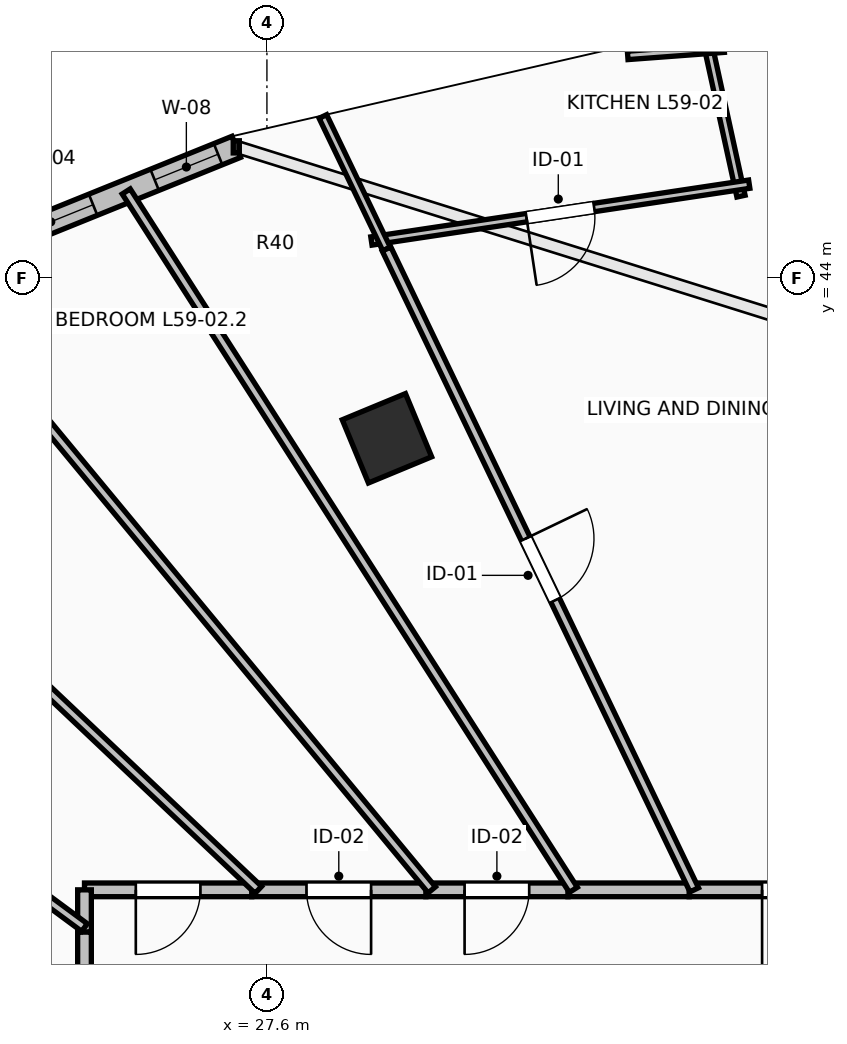
"""IFC4 building model, lengths in metres.
Left out: names, types, materials, properties, quantities, classifications, styles, units other than length and angle.
Written with IfcOpenShell. Run it as: python <this file> out.ifc"""

import sys

from ifc_helpers import new_model, si_unit, direction, frame, frame_2d, origin, origin_2d, place, context, subcontext, project, spatial, rectangle, extrude, element, fill, save


model = new_model("IFC4")
c1 = context("Model", 3, precision=1e-05, world=origin(), true_north=direction((0.0, 1.0)))
c2 = subcontext(c1, "Body", "Model", "MODEL_VIEW")
j1 = project(units=[si_unit("LENGTHUNIT", "METRE"), si_unit("PLANEANGLEUNIT", "RADIAN")], contexts=[c1])
p1 = place(None, origin())
s1 = spatial("IfcSite", under=j1, at=p1, CompositionType="ELEMENT")
p2 = place(p1, origin())
s2 = spatial("IfcBuilding", under=s1, at=p2, CompositionType="ELEMENT")
p3 = place(p2, frame((0.0, 0.0, 217.85)))
s3 = spatial("IfcBuildingStorey", under=s2, at=p3, CompositionType="ELEMENT", Elevation=217.85)
p4 = place(p3, frame((29.179, 41.891, 0.0), z_axis=(0.0, 0.0, 1.0), x_axis=(-0.382683432365, 0.923879532511, 0.0)))
e1 = element("IfcColumn", 1, at=p4, inside=s3, PredefinedType="COLUMN", context=c2, shape_type="SweptSolid", body=[
    extrude(rectangle(XDim=0.9, YDim=0.9, at=origin_2d()), origin(), (0.0, 0.0, 1.0), 3.55),
])
p5 = place(p3, frame((27.197, 45.725, 0.0), z_axis=(0.0, 0.0, 1.0), x_axis=(-0.927111094334, -0.374786630981, 0.0)))
e2 = element("IfcWall", 2, at=p5, inside=s3, PredefinedType="STANDARD", context=c2, shape_type="SweptSolid", body=[
    extrude(rectangle(XDim=5.264, YDim=0.3, at=frame_2d((2.632, 0.0))), origin(), (0.0, 0.0, 1.0), 3.29),
])
p6 = place(p5, frame((0.258, 0.0, 0.85)))
e3 = element("IfcOpeningElement", 3, at=p6, cuts=e2, PredefinedType="OPENING", context=c2, shape_type="SweptSolid", body=[
    extrude(rectangle(XDim=0.9, YDim=1.8, at=frame_2d((0.45, 0.9))), frame((0.0, 0.165, 0.0), z_axis=(0.0, -1.0, 0.0), x_axis=(1.0, 0.0, 0.0)), (0.0, 0.0, 1.0), 0.33),
])
p7 = place(p5, frame((2.032, 0.0, 0.85)))
e4 = element("IfcOpeningElement", 4, at=p7, cuts=e2, PredefinedType="OPENING", context=c2, shape_type="SweptSolid", body=[
    extrude(rectangle(XDim=1.2, YDim=1.95, at=frame_2d((0.6, 0.975))), frame((0.0, 0.165, 0.0), z_axis=(0.0, -1.0, 0.0), x_axis=(1.0, 0.0, 0.0)), (0.0, 0.0, 1.0), 0.33),
])
p8 = place(p3, frame((36.074, 35.95, 0.0), z_axis=(0.0, 0.0, 1.0), x_axis=(-1.0, 0.0, 0.0)))
e5 = element("IfcWall", 5, at=p8, inside=s3, PredefinedType="PARTITIONING", context=c2, shape_type="SweptSolid", body=[
    extrude(rectangle(XDim=2.919, YDim=0.18, at=frame_2d((1.459, 0.0))), origin(), (0.0, 0.0, 1.0), 3.29),
])
p9 = place(p8, frame((0.959, 0.0, 0.0)))
e6 = element("IfcOpeningElement", 6, at=p9, cuts=e5, PredefinedType="OPENING", context=c2, shape_type="SweptSolid", body=[
    extrude(rectangle(XDim=1.0, YDim=2.15, at=frame_2d((0.5, 1.075))), frame((0.0, 0.105, 0.0), z_axis=(0.0, -1.0, 0.0), x_axis=(1.0, 0.0, 0.0)), (0.0, 0.0, 1.0), 0.21),
])
p10 = place(p3, frame((33.155, 35.95, 0.0), z_axis=(0.0, 0.0, 1.0), x_axis=(-1.0, 0.0, 0.0)))
e7 = element("IfcWall", 7, at=p10, inside=s3, PredefinedType="PARTITIONING", context=c2, shape_type="SweptSolid", body=[
    extrude(rectangle(XDim=1.595, YDim=0.18, at=frame_2d((0.797, 0.0))), origin(), (0.0, 0.0, 1.0), 3.29),
])
p11 = place(p3, frame((31.56, 35.95, 0.0), z_axis=(0.0, 0.0, 1.0), x_axis=(-1.0, 0.0, 0.0)))
e8 = element("IfcWall", 8, at=p11, inside=s3, PredefinedType="PARTITIONING", context=c2, shape_type="SweptSolid", body=[
    extrude(rectangle(XDim=1.869, YDim=0.18, at=frame_2d((0.935, 0.0))), origin(), (0.0, 0.0, 1.0), 2.482),
])
p12 = place(p11, frame((0.51, 0.0, 0.0)))
e9 = element("IfcOpeningElement", 9, at=p12, cuts=e8, PredefinedType="OPENING", context=c2, shape_type="SweptSolid", body=[
    extrude(rectangle(XDim=0.85, YDim=2.1, at=frame_2d((0.425, 1.05))), frame((0.0, 0.105, 0.0), z_axis=(0.0, -1.0, 0.0), x_axis=(1.0, 0.0, 0.0)), (0.0, 0.0, 1.0), 0.21),
])
p13 = place(p3, frame((29.691, 35.95, 0.0), z_axis=(0.0, 0.0, 1.0), x_axis=(-1.0, 0.0, 0.0)))
e10 = element("IfcWall", 10, at=p13, inside=s3, PredefinedType="PARTITIONING", context=c2, shape_type="SweptSolid", body=[
    extrude(rectangle(XDim=2.291, YDim=0.18, at=frame_2d((1.146, 0.0))), origin(), (0.0, 0.0, 1.0), 2.482),
])
p14 = place(p13, frame((0.72, 0.0, 0.0)))
e11 = element("IfcOpeningElement", 11, at=p14, cuts=e10, PredefinedType="OPENING", context=c2, shape_type="SweptSolid", body=[
    extrude(rectangle(XDim=0.85, YDim=2.1, at=frame_2d((0.425, 1.05))), frame((0.0, 0.105, 0.0), z_axis=(0.0, -1.0, 0.0), x_axis=(1.0, 0.0, 0.0)), (0.0, 0.0, 1.0), 0.21),
])
p15 = place(p3, frame((27.4, 35.95, 0.0), z_axis=(0.0, 0.0, 1.0), x_axis=(-1.0, 0.0, 0.0)))
e12 = element("IfcWall", 12, at=p15, inside=s3, PredefinedType="PARTITIONING", context=c2, shape_type="SweptSolid", body=[
    extrude(rectangle(XDim=2.2, YDim=0.18, at=frame_2d((1.1, 0.0))), origin(), (0.0, 0.0, 1.0), 2.924),
])
p16 = place(p15, frame((0.675, 0.0, 0.0)))
e13 = element("IfcOpeningElement", 13, at=p16, cuts=e12, PredefinedType="OPENING", context=c2, shape_type="SweptSolid", body=[
    extrude(rectangle(XDim=0.85, YDim=2.1, at=frame_2d((0.425, 1.05))), frame((0.0, 0.105, 0.0), z_axis=(0.0, -1.0, 0.0), x_axis=(1.0, 0.0, 0.0)), (0.0, 0.0, 1.0), 0.21),
])
p17 = place(p3, frame((25.2, 35.95, 0.0), z_axis=(0.0, 0.0, 1.0), x_axis=(0.0, -1.0, 0.0)))
e14 = element("IfcWall", 14, at=p17, inside=s3, PredefinedType="PARTITIONING", context=c2, shape_type="SweptSolid", body=[
    extrude(rectangle(XDim=0.556, YDim=0.18, at=frame_2d((0.278, 0.0))), origin(), (0.0, 0.0, 1.0), 3.29),
])
p18 = place(p3, frame((25.2, 35.394, 0.0), z_axis=(0.0, 0.0, 1.0), x_axis=(0.0, -1.0, 0.0)))
e15 = element("IfcWall", 15, at=p18, inside=s3, PredefinedType="PARTITIONING", context=c2, shape_type="SweptSolid", body=[
    extrude(rectangle(XDim=2.219, YDim=0.18, at=frame_2d((1.109, 0.0))), origin(), (0.0, 0.0, 1.0), 2.482),
])
p19 = place(p18, frame((0.685, 0.0, 0.0)))
e16 = element("IfcOpeningElement", 16, at=p19, cuts=e15, PredefinedType="OPENING", context=c2, shape_type="SweptSolid", body=[
    extrude(rectangle(XDim=0.85, YDim=2.1, at=frame_2d((0.425, 1.05))), frame((0.0, 0.105, 0.0), z_axis=(0.0, -1.0, 0.0), x_axis=(1.0, 0.0, 0.0)), (0.0, 0.0, 1.0), 0.21),
])
p20 = place(p3, frame((33.385, 47.144, 0.0), z_axis=(0.0, 0.0, 1.0), x_axis=(0.213521424511, -0.976938381514, 0.0)))
e17 = element("IfcWall", 17, at=p20, inside=s3, PredefinedType="PARTITIONING", context=c2, shape_type="SweptSolid", body=[
    extrude(rectangle(XDim=2.116, YDim=0.11, at=frame_2d((1.058, 0.0))), origin(), (0.0, 0.0, 1.0), 3.29),
])
p21 = place(p3, frame((33.945, 45.234, 0.0), z_axis=(0.0, 0.0, 1.0), x_axis=(-0.988872134662, -0.148767944424, 0.0)))
e18 = element("IfcWall", 18, at=p21, inside=s3, PredefinedType="PARTITIONING", context=c2, shape_type="SweptSolid", body=[
    extrude(rectangle(XDim=5.027, YDim=0.11, at=frame_2d((2.513, 0.0))), origin(), (0.0, 0.0, 1.0), 3.29),
])
p22 = place(p21, frame((2.063, 0.0, 0.0)))
e19 = element("IfcOpeningElement", 19, at=p22, cuts=e18, PredefinedType="OPENING", context=c2, shape_type="SweptSolid", body=[
    extrude(rectangle(XDim=0.9, YDim=2.1, at=frame_2d((0.45, 1.05))), frame((0.0, 0.07, 0.0), z_axis=(0.0, -1.0, 0.0), x_axis=(1.0, 0.0, 0.0)), (0.0, 0.0, 1.0), 0.14),
])
p23 = place(p3, frame((29.174, 44.381, 0.0), z_axis=(0.0, 0.0, 1.0), x_axis=(-0.432866492457, 0.901458041014, 0.0)))
e20 = element("IfcWall", 20, at=p23, inside=s3, PredefinedType="PARTITIONING", context=c2, shape_type="SweptSolid", body=[
    extrude(rectangle(XDim=1.934, YDim=0.11, at=frame_2d((0.967, 0.0))), origin(), (0.0, 0.0, 1.0), 3.29),
])
p24 = place(p3, frame((33.615, 47.022, 0.0), z_axis=(0.0, 0.0, 1.0), x_axis=(-0.997207179737, -0.074684942803, 0.0)))
e21 = element("IfcWall", 21, at=p24, inside=s3, PredefinedType="PARTITIONING", context=c2, shape_type="SweptSolid", body=[
    extrude(rectangle(XDim=1.272, YDim=0.11, at=frame_2d((0.636, 0.0))), origin(), (0.0, 0.0, 1.0), 3.29),
])
p25 = place(p3, frame((29.174, 44.381, 0.0), z_axis=(0.0, 0.0, 1.0), x_axis=(0.432861754343, -0.901460316169, 0.0)))
e22 = element("IfcWall", 22, at=p25, inside=s3, PredefinedType="PARTITIONING", context=c2, shape_type="SweptSolid", body=[
    extrude(rectangle(XDim=9.353, YDim=0.125, at=frame_2d((4.676, 0.0))), origin(), (0.0, 0.0, 1.0), 2.482),
])
p26 = place(p25, frame((4.226, 0.0, 0.0)))
e23 = element("IfcOpeningElement", 23, at=p26, cuts=e22, PredefinedType="OPENING", context=c2, shape_type="SweptSolid", body=[
    extrude(rectangle(XDim=0.9, YDim=2.1, at=frame_2d((0.45, 1.05))), frame((0.0, 0.077, 0.0), z_axis=(0.0, -1.0, 0.0), x_axis=(1.0, 0.0, 0.0)), (0.0, 0.0, 1.0), 0.155),
])
p27 = place(p3, frame((25.749, 45.138, 0.0), z_axis=(0.0, 0.0, 1.0), x_axis=(0.539168632786, -0.842197830335, 0.0)))
e24 = element("IfcWall", 24, at=p27, inside=s3, PredefinedType="PARTITIONING", context=c2, shape_type="SweptSolid", body=[
    extrude(rectangle(XDim=10.909, YDim=0.125, at=frame_2d((5.455, 0.0))), origin(), (0.0, 0.0, 1.0), 2.482),
])
p28 = place(p3, frame((23.066, 44.052, 0.0), z_axis=(0.0, 0.0, 1.0), x_axis=(0.637453668746, -0.770488689211, 0.0)))
e25 = element("IfcWall", 25, at=p28, inside=s3, PredefinedType="PARTITIONING", context=c2, shape_type="SweptSolid", body=[
    extrude(rectangle(XDim=10.515, YDim=0.125, at=frame_2d((5.258, 0.0))), origin(), (0.0, 0.0, 1.0), 2.482),
])
p29 = place(p3, frame((20.462, 42.599, 0.0), z_axis=(0.0, 0.0, 1.0), x_axis=(0.726274273347, -0.687405033349, 0.0)))
e26 = element("IfcWall", 26, at=p29, inside=s3, PredefinedType="PARTITIONING", context=c2, shape_type="SweptSolid", body=[
    extrude(rectangle(XDim=9.673, YDim=0.125, at=frame_2d((4.836, 0.0))), origin(), (0.0, 0.0, 1.0), 2.824),
])
p30 = place(p3, frame((17.826, 40.901, 0.0), z_axis=(0.0, 0.0, 1.0), x_axis=(0.804363169868, -0.594137939338, 0.0)))
e27 = element("IfcWall", 27, at=p30, inside=s3, PredefinedType="PARTITIONING", context=c2, shape_type="SweptSolid", body=[
    extrude(rectangle(XDim=9.167, YDim=0.125, at=frame_2d((4.584, 0.0))), origin(), (0.0, 0.0, 1.0), 2.482),
])
p31 = place(p3, frame((15.476, 38.731, 0.0), z_axis=(0.0, 0.0, 1.0), x_axis=(0.870572608778, -0.49203997078, 0.0)))
e28 = element("IfcWall", 28, at=p31, inside=s3, PredefinedType="PARTITIONING", context=c2, shape_type="SweptSolid", body=[
    extrude(rectangle(XDim=11.169, YDim=0.125, at=frame_2d((5.585, 0.0))), origin(), (0.0, 0.0, 1.0), 2.824),
])
p32 = place(p6, origin())
e29 = element("IfcWindow", 29, at=p32, inside=s3, PartitioningType="SINGLE_PANEL", PredefinedType="WINDOW", context=c2, shape_type="SweptSolid", body=[
    extrude(rectangle(XDim=0.9, YDim=1.8, at=frame_2d((0.45, 0.9))), frame((0.0, 0.03, 0.0), z_axis=(0.0, -1.0, 0.0), x_axis=(1.0, 0.0, 0.0)), (0.0, 0.0, 1.0), 0.06),
])
fill(e3, e29)
p33 = place(p7, origin())
e30 = element("IfcWindow", 30, at=p33, inside=s3, PartitioningType="SINGLE_PANEL", PredefinedType="WINDOW", context=c2, shape_type="SweptSolid", body=[
    extrude(rectangle(XDim=1.2, YDim=1.95, at=frame_2d((0.6, 0.975))), frame((0.0, 0.03, 0.0), z_axis=(0.0, -1.0, 0.0), x_axis=(1.0, 0.0, 0.0)), (0.0, 0.0, 1.0), 0.06),
])
fill(e4, e30)
p34 = place(p9, origin())
e31 = element("IfcDoor", 31, at=p34, inside=s3, OperationType="SINGLE_SWING_RIGHT", PredefinedType="DOOR", context=c2, shape_type="SweptSolid", body=[
    extrude(rectangle(XDim=1.0, YDim=2.15, at=frame_2d((0.5, 1.075))), frame((0.0, 0.025, 0.0), z_axis=(0.0, -1.0, 0.0), x_axis=(1.0, 0.0, 0.0)), (0.0, 0.0, 1.0), 0.05),
])
fill(e6, e31)
p35 = place(p22, origin())
e32 = element("IfcDoor", 32, at=p35, inside=s3, OperationType="SINGLE_SWING_RIGHT", PredefinedType="DOOR", context=c2, shape_type="SweptSolid", body=[
    extrude(rectangle(XDim=0.9, YDim=2.1, at=frame_2d((0.45, 1.05))), frame((0.0, 0.025, 0.0), z_axis=(0.0, -1.0, 0.0), x_axis=(1.0, 0.0, 0.0)), (0.0, 0.0, 1.0), 0.05),
])
fill(e19, e32)
p36 = place(p26, origin())
e33 = element("IfcDoor", 33, at=p36, inside=s3, OperationType="SINGLE_SWING_LEFT", PredefinedType="DOOR", context=c2, shape_type="SweptSolid", body=[
    extrude(rectangle(XDim=0.9, YDim=2.1, at=frame_2d((0.45, 1.05))), frame((0.0, 0.025, 0.0), z_axis=(0.0, -1.0, 0.0), x_axis=(1.0, 0.0, 0.0)), (0.0, 0.0, 1.0), 0.05),
])
fill(e23, e33)
p37 = place(p12, origin())
e34 = element("IfcDoor", 34, at=p37, inside=s3, OperationType="SINGLE_SWING_RIGHT", PredefinedType="DOOR", context=c2, shape_type="SweptSolid", body=[
    extrude(rectangle(XDim=0.85, YDim=2.1, at=frame_2d((0.425, 1.05))), frame((0.0, 0.025, 0.0), z_axis=(0.0, -1.0, 0.0), x_axis=(1.0, 0.0, 0.0)), (0.0, 0.0, 1.0), 0.05),
])
fill(e9, e34)
p38 = place(p14, origin())
e35 = element("IfcDoor", 35, at=p38, inside=s3, OperationType="SINGLE_SWING_LEFT", PredefinedType="DOOR", context=c2, shape_type="SweptSolid", body=[
    extrude(rectangle(XDim=0.85, YDim=2.1, at=frame_2d((0.425, 1.05))), frame((0.0, 0.025, 0.0), z_axis=(0.0, -1.0, 0.0), x_axis=(1.0, 0.0, 0.0)), (0.0, 0.0, 1.0), 0.05),
])
fill(e11, e35)
p39 = place(p16, origin())
e36 = element("IfcDoor", 36, at=p39, inside=s3, OperationType="SINGLE_SWING_RIGHT", PredefinedType="DOOR", context=c2, shape_type="SweptSolid", body=[
    extrude(rectangle(XDim=0.85, YDim=2.1, at=frame_2d((0.425, 1.05))), frame((0.0, 0.025, 0.0), z_axis=(0.0, -1.0, 0.0), x_axis=(1.0, 0.0, 0.0)), (0.0, 0.0, 1.0), 0.05),
])
fill(e13, e36)
save(model, sys.argv[1])
